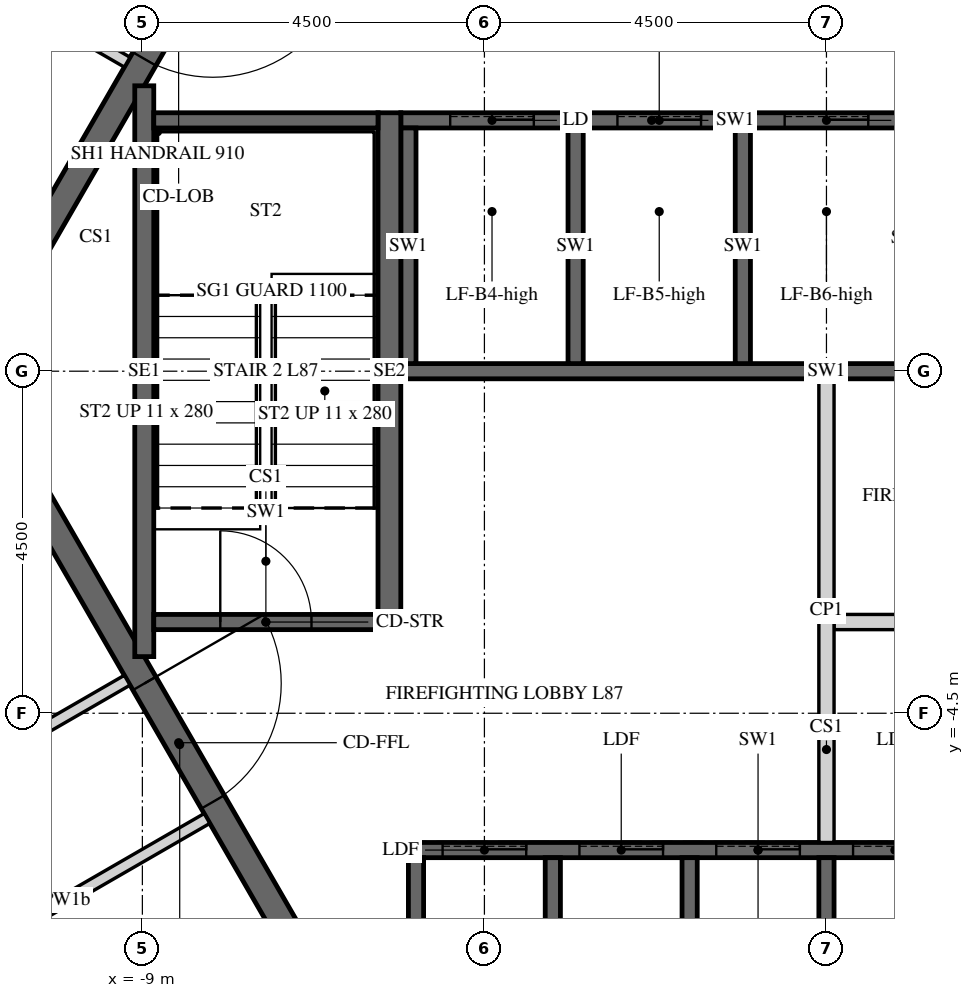
"""IFC4 building model, lengths in metres.
Left out: names, types, materials, properties, quantities, classifications, styles, units other than length and angle.
Written with IfcOpenShell. Run it as: python <this file> out.ifc"""

import sys

from ifc_helpers import new_model, si_unit, direction, frame, frame_2d, origin, place, context, subcontext, project, spatial, polyline, rectangle, outline, extrude, element, fill, save


model = new_model("IFC4")
c1 = context("Model", 3, precision=1e-05, world=origin(), true_north=direction((0.0, 1.0)))
c2 = subcontext(c1, "Body", "Model", "MODEL_VIEW")
j1 = project(units=[si_unit("LENGTHUNIT", "METRE"), si_unit("PLANEANGLEUNIT", "RADIAN")], contexts=[c1])
p1 = place(None, origin())
s1 = spatial("IfcSite", under=j1, at=p1, CompositionType="ELEMENT")
p2 = place(p1, origin())
s2 = spatial("IfcBuilding", under=s1, at=p2, CompositionType="ELEMENT")
p3 = place(p2, frame((0.0, 0.0, 361.2)))
s3 = spatial("IfcBuildingStorey", under=s2, at=p3, CompositionType="ELEMENT", Elevation=361.2)
p4 = place(p3, frame((-5.673, 9.825, -0.15), z_axis=(0.0, 0.0, 1.0), x_axis=(-0.499995046907, -0.866028263435, 0.0)))
e1 = element("IfcWall", 1, at=p4, inside=s3, PredefinedType="SHEAR", context=c2, shape_type="SweptSolid", body=[
    extrude(outline(polyline([(-0.101, -0.175), (11.446, -0.175), (11.244, 0.175), (0.101, 0.175), (-0.101, -0.175)])), origin(), (0.0, 0.0, 1.0), 3.9),
])
p5 = place(p4, frame((4.801, 0.0, 0.15)))
e2 = element("IfcOpeningElement", 2, at=p5, cuts=e1, PredefinedType="OPENING", context=c2, shape_type="SweptSolid", body=[
    extrude(rectangle(XDim=1.8, YDim=2.4, at=frame_2d((0.9, 1.2))), frame((0.0, 0.185, 0.0), z_axis=(0.0, -1.0, 0.0), x_axis=(1.0, 0.0, 0.0)), (0.0, 0.0, 1.0), 0.37),
])
p6 = place(p3, frame((-11.345, 0.0, -0.15), z_axis=(0.0, 0.0, 1.0), x_axis=(0.499995046907, -0.866028263435, 0.0)))
e3 = element("IfcWall", 3, at=p6, inside=s3, PredefinedType="SHEAR", context=c2, shape_type="SweptSolid", body=[
    extrude(outline(polyline([(-0.101, -0.175), (11.446, -0.175), (11.244, 0.175), (0.101, 0.175), (-0.101, -0.175)])), origin(), (0.0, 0.0, 1.0), 3.9),
])
p7 = place(p6, frame((4.744, 0.0, 0.15)))
e4 = element("IfcOpeningElement", 4, at=p7, cuts=e3, PredefinedType="OPENING", context=c2, shape_type="SweptSolid", body=[
    extrude(rectangle(XDim=1.8, YDim=2.4, at=frame_2d((0.9, 1.2))), frame((0.0, 0.185, 0.0), z_axis=(0.0, -1.0, 0.0), x_axis=(1.0, 0.0, 0.0)), (0.0, 0.0, 1.0), 0.37),
])
p8 = place(p3, frame((-5.6, 3.3, -0.25), z_axis=(0.0, 0.0, 1.0), x_axis=(1.0, 0.0, 0.0)))
e5 = element("IfcWall", 5, at=p8, inside=s3, PredefinedType="SHEAR", context=c2, shape_type="SweptSolid", body=[
    extrude(rectangle(XDim=6.6, YDim=0.2, at=frame_2d((3.3, 0.0))), origin(), (0.0, 0.0, 1.0), 3.9),
])
p9 = place(p8, frame((0.65, 0.0, 0.25)))
e6 = element("IfcOpeningElement", 6, at=p9, cuts=e5, PredefinedType="OPENING", context=c2, shape_type="SweptSolid", body=[
    extrude(rectangle(XDim=1.1, YDim=2.1, at=frame_2d((0.55, 1.05))), frame((0.0, 0.11, 0.0), z_axis=(0.0, -1.0, 0.0), x_axis=(1.0, 0.0, 0.0)), (0.0, 0.0, 1.0), 0.22),
])
p10 = place(p8, frame((2.85, 0.0, 0.25)))
e7 = element("IfcOpeningElement", 7, at=p10, cuts=e5, PredefinedType="OPENING", context=c2, shape_type="SweptSolid", body=[
    extrude(rectangle(XDim=1.1, YDim=2.1, at=frame_2d((0.55, 1.05))), frame((0.0, 0.11, 0.0), z_axis=(0.0, -1.0, 0.0), x_axis=(1.0, 0.0, 0.0)), (0.0, 0.0, 1.0), 0.22),
])
p11 = place(p8, frame((5.05, 0.0, 0.25)))
e8 = element("IfcOpeningElement", 8, at=p11, cuts=e5, PredefinedType="OPENING", context=c2, shape_type="SweptSolid", body=[
    extrude(rectangle(XDim=1.1, YDim=2.1, at=frame_2d((0.55, 1.05))), frame((0.0, 0.11, 0.0), z_axis=(0.0, -1.0, 0.0), x_axis=(1.0, 0.0, 0.0)), (0.0, 0.0, 1.0), 0.22),
])
p12 = place(p3, frame((-5.6, 0.0, -0.25), z_axis=(0.0, 0.0, 1.0), x_axis=(1.0, 0.0, 0.0)))
e9 = element("IfcWall", 9, at=p12, inside=s3, PredefinedType="SHEAR", context=c2, shape_type="SweptSolid", body=[
    extrude(rectangle(XDim=11.2, YDim=0.2, at=frame_2d((5.6, 0.0))), origin(), (0.0, 0.0, 1.0), 3.9),
])
for number, where, z_axis, x_axis in (
    (10, (-5.5, 0.1, -0.25), (0.0, 0.0, 1.0), (0.0, 1.0, 0.0)),
    (11, (-3.3, 0.1, -0.25), (0.0, 0.0, 1.0), (0.0, 1.0, 0.0)),
    (12, (-1.1, 0.1, -0.25), (0.0, 0.0, 1.0), (0.0, 1.0, 0.0)),
):
    element("IfcWall", number, at=place(p3, frame(where, z_axis=z_axis, x_axis=x_axis)), inside=s3, PredefinedType="SHEAR", context=c2, shape_type="SweptSolid", body=[
        extrude(rectangle(XDim=3.1, YDim=0.2, at=frame_2d((1.55, 0.0))), origin(), (0.0, 0.0, 1.0), 3.9),
    ])
p13 = place(p3, frame((-5.5, -6.3, -0.25), z_axis=(0.0, 0.0, 1.0), x_axis=(1.0, 0.0, 0.0)))
e13 = element("IfcWall", 13, at=p13, inside=s3, PredefinedType="SHEAR", context=c2, shape_type="SweptSolid", body=[
    extrude(rectangle(XDim=9.2, YDim=0.2, at=frame_2d((4.6, 0.0))), origin(), (0.0, 0.0, 1.0), 3.9),
])
p14 = place(p13, frame((0.45, 0.0, 0.25)))
e14 = element("IfcOpeningElement", 14, at=p14, cuts=e13, PredefinedType="OPENING", context=c2, shape_type="SweptSolid", body=[
    extrude(rectangle(XDim=1.1, YDim=2.1, at=frame_2d((0.55, 1.05))), frame((0.0, 0.11, 0.0), z_axis=(0.0, -1.0, 0.0), x_axis=(1.0, 0.0, 0.0)), (0.0, 0.0, 1.0), 0.22),
])
p15 = place(p13, frame((2.25, 0.0, 0.25)))
e15 = element("IfcOpeningElement", 15, at=p15, cuts=e13, PredefinedType="OPENING", context=c2, shape_type="SweptSolid", body=[
    extrude(rectangle(XDim=1.1, YDim=2.1, at=frame_2d((0.55, 1.05))), frame((0.0, 0.11, 0.0), z_axis=(0.0, -1.0, 0.0), x_axis=(1.0, 0.0, 0.0)), (0.0, 0.0, 1.0), 0.22),
])
p16 = place(p13, frame((4.05, 0.0, 0.25)))
e16 = element("IfcOpeningElement", 16, at=p16, cuts=e13, PredefinedType="OPENING", context=c2, shape_type="SweptSolid", body=[
    extrude(rectangle(XDim=1.1, YDim=2.1, at=frame_2d((0.55, 1.05))), frame((0.0, 0.11, 0.0), z_axis=(0.0, -1.0, 0.0), x_axis=(1.0, 0.0, 0.0)), (0.0, 0.0, 1.0), 0.22),
])
p17 = place(p13, frame((5.85, 0.0, 0.25)))
e17 = element("IfcOpeningElement", 17, at=p17, cuts=e13, PredefinedType="OPENING", context=c2, shape_type="SweptSolid", body=[
    extrude(rectangle(XDim=1.1, YDim=2.1, at=frame_2d((0.55, 1.05))), frame((0.0, 0.11, 0.0), z_axis=(0.0, -1.0, 0.0), x_axis=(1.0, 0.0, 0.0)), (0.0, 0.0, 1.0), 0.22),
])
p18 = place(p13, frame((7.65, 0.0, 0.25)))
e18 = element("IfcOpeningElement", 18, at=p18, cuts=e13, PredefinedType="OPENING", context=c2, shape_type="SweptSolid", body=[
    extrude(rectangle(XDim=1.1, YDim=2.1, at=frame_2d((0.55, 1.05))), frame((0.0, 0.11, 0.0), z_axis=(0.0, -1.0, 0.0), x_axis=(1.0, 0.0, 0.0)), (0.0, 0.0, 1.0), 0.22),
])
for number, where, z_axis, x_axis in (
    (19, (-5.4, -9.3, -0.25), (0.0, 0.0, 1.0), (0.0, 1.0, 0.0)),
    (20, (-3.6, -9.3, -0.25), (0.0, 0.0, 1.0), (0.0, 1.0, 0.0)),
    (21, (-1.8, -9.3, -0.25), (0.0, 0.0, 1.0), (0.0, 1.0, 0.0)),
    (22, (0.0, -9.3, -0.25), (0.0, 0.0, 1.0), (0.0, 1.0, 0.0)),
):
    element("IfcWall", number, at=place(p3, frame(where, z_axis=z_axis, x_axis=x_axis)), inside=s3, PredefinedType="SHEAR", context=c2, shape_type="SweptSolid", body=[
        extrude(rectangle(XDim=2.9, YDim=0.2, at=frame_2d((1.45, 0.0))), origin(), (0.0, 0.0, 1.0), 3.9),
    ])
p19 = place(p3, frame((0.1, -3.3, 0.0), z_axis=(0.0, 0.0, 1.0), x_axis=(1.0, 0.0, 0.0)))
e23 = element("IfcWall", 23, at=p19, inside=s3, PredefinedType="PARTITIONING", context=c2, shape_type="SweptSolid", body=[
    extrude(rectangle(XDim=5.5, YDim=0.2, at=frame_2d((2.75, 0.0))), origin(), (0.0, 0.0, 1.0), 3.65),
])
p20 = place(p19, frame((2.3, 0.0, 0.0)))
e24 = element("IfcOpeningElement", 24, at=p20, cuts=e23, PredefinedType="OPENING", context=c2, shape_type="SweptSolid", body=[
    extrude(rectangle(XDim=0.9, YDim=2.1, at=frame_2d((0.45, 1.05))), frame((0.0, 0.11, 0.0), z_axis=(0.0, -1.0, 0.0), x_axis=(1.0, 0.0, 0.0)), (0.0, 0.0, 1.0), 0.22),
])
p21 = place(p3, frame((0.0, -6.2, 0.0), z_axis=(0.0, 0.0, 1.0), x_axis=(0.0, 1.0, 0.0)))
e25 = element("IfcWall", 25, at=p21, inside=s3, PredefinedType="PARTITIONING", context=c2, shape_type="SweptSolid", body=[
    extrude(rectangle(XDim=6.1, YDim=0.2, at=frame_2d((3.05, 0.0))), origin(), (0.0, 0.0, 1.0), 3.65),
])
p22 = place(p3, frame((-5.75, -3.4, -0.25), z_axis=(0.0, 0.0, 1.0), x_axis=(0.0, 1.0, 0.0)))
e26 = element("IfcWall", 26, at=p22, inside=s3, PredefinedType="SHEAR", context=c2, shape_type="SweptSolid", body=[
    extrude(rectangle(XDim=6.8, YDim=0.3, at=frame_2d((3.4, 0.0))), origin(), (0.0, 0.0, 1.0), 3.9),
])
p23 = place(p3, frame((-8.975, -3.755, -0.25), z_axis=(0.0, 0.0, 1.0), x_axis=(0.0, 1.0, 0.0)))
e27 = element("IfcWall", 27, at=p23, inside=s3, PredefinedType="SHEAR", context=c2, shape_type="SweptSolid", body=[
    extrude(rectangle(XDim=7.51, YDim=0.25, at=frame_2d((3.755, 0.0))), origin(), (0.0, 0.0, 1.0), 3.9),
])
p24 = place(p3, frame((-8.85, 3.3, -0.25), z_axis=(0.0, 0.0, 1.0), x_axis=(1.0, 0.0, 0.0)))
e28 = element("IfcWall", 28, at=p24, inside=s3, PredefinedType="SHEAR", context=c2, shape_type="SweptSolid", body=[
    extrude(rectangle(XDim=2.95, YDim=0.2, at=frame_2d((1.475, 0.0))), origin(), (0.0, 0.0, 1.0), 3.9),
])
p25 = place(p3, frame((-8.85, -3.3, -0.25), z_axis=(0.0, 0.0, 1.0), x_axis=(1.0, 0.0, 0.0)))
e29 = element("IfcWall", 29, at=p25, inside=s3, PredefinedType="SHEAR", context=c2, shape_type="SweptSolid", body=[
    extrude(rectangle(XDim=2.95, YDim=0.2, at=frame_2d((1.475, 0.0))), origin(), (0.0, 0.0, 1.0), 3.9),
])
p26 = place(p25, frame((0.875, 0.0, 0.25)))
e30 = element("IfcOpeningElement", 30, at=p26, cuts=e29, PredefinedType="OPENING", context=c2, shape_type="SweptSolid", body=[
    extrude(rectangle(XDim=1.2, YDim=2.4, at=frame_2d((0.6, 1.2))), frame((0.0, 0.11, 0.0), z_axis=(0.0, -1.0, 0.0), x_axis=(1.0, 0.0, 0.0)), (0.0, 0.0, 1.0), 0.22),
])
p27 = place(p3, frame((-7.903, 16.075, 0.0), z_axis=(0.0, 0.0, 1.0), x_axis=(-0.438364761272, -0.898797160696, 0.0)))
e31 = element("IfcWall", 31, at=p27, inside=s3, PredefinedType="PARTITIONING", context=c2, shape_type="SweptSolid", body=[
    extrude(rectangle(XDim=15.688, YDim=0.15, at=frame_2d((7.844, 0.0))), origin(), (0.0, 0.0, 1.0), 2.82),
])
p28 = place(p27, frame((5.042, 0.0, 0.0)))
e32 = element("IfcOpeningElement", 32, at=p28, cuts=e31, PredefinedType="OPENING", context=c2, shape_type="SweptSolid", body=[
    extrude(rectangle(XDim=1.0, YDim=2.1, at=frame_2d((0.5, 1.05))), frame((0.0, 0.085, 0.0), z_axis=(0.0, -1.0, 0.0), x_axis=(1.0, 0.0, 0.0)), (0.0, 0.0, 1.0), 0.17),
])
p29 = place(p3, frame((-11.131, 5.18, 0.0), z_axis=(0.0, 0.0, 1.0), x_axis=(0.866037886895, -0.499978377995, 0.0)))
e33 = element("IfcWall", 33, at=p29, inside=s3, PredefinedType="PARTITIONING", context=c2, shape_type="SweptSolid", body=[
    extrude(rectangle(XDim=2.229, YDim=0.15, at=frame_2d((1.115, 0.0))), origin(), (0.0, 0.0, 1.0), 2.82),
])
p30 = place(p3, frame((-17.036, -2.792, 0.0), z_axis=(0.0, 0.0, 1.0), x_axis=(0.500006428338, -0.86602169235, 0.0)))
e34 = element("IfcWall", 34, at=p30, inside=s3, PredefinedType="PARTITIONING", context=c2, shape_type="SweptSolid", body=[
    extrude(rectangle(XDim=13.966, YDim=0.15, at=frame_2d((6.983, 0.0))), origin(), (0.0, 0.0, 1.0), 2.82),
])
p31 = place(p30, frame((3.325, 0.0, 0.0)))
e35 = element("IfcOpeningElement", 35, at=p31, cuts=e34, PredefinedType="OPENING", context=c2, shape_type="SweptSolid", body=[
    extrude(rectangle(XDim=1.0, YDim=2.1, at=frame_2d((0.5, 1.05))), frame((0.0, 0.085, 0.0), z_axis=(0.0, -1.0, 0.0), x_axis=(1.0, 0.0, 0.0)), (0.0, 0.0, 1.0), 0.17),
])
p32 = place(p3, frame((-9.2, -4.066, 0.0), z_axis=(0.0, 0.0, 1.0), x_axis=(-0.866013608182, -0.500020430026, 0.0)))
e36 = element("IfcWall", 36, at=p32, inside=s3, PredefinedType="PARTITIONING", context=c2, shape_type="SweptSolid", body=[
    extrude(rectangle(XDim=4.35, YDim=0.15, at=frame_2d((2.175, 0.0))), origin(), (0.0, 0.0, 1.0), 2.82),
])
p33 = place(p32, frame((1.725, 0.0, 0.0)))
e37 = element("IfcOpeningElement", 37, at=p33, cuts=e36, PredefinedType="OPENING", context=c2, shape_type="SweptSolid", body=[
    extrude(rectangle(XDim=0.9, YDim=2.1, at=frame_2d((0.45, 1.05))), frame((0.0, 0.085, 0.0), z_axis=(0.0, -1.0, 0.0), x_axis=(1.0, 0.0, 0.0)), (0.0, 0.0, 1.0), 0.17),
])
p34 = place(p3, frame((-11.852, -8.022, 0.0), z_axis=(0.0, 0.0, 1.0), x_axis=(0.866038183914, 0.499977863513, 0.0)))
e38 = element("IfcWall", 38, at=p34, inside=s3, PredefinedType="PARTITIONING", context=c2, shape_type="SweptSolid", body=[
    extrude(rectangle(XDim=4.275, YDim=0.15, at=frame_2d((2.138, 0.0))), origin(), (0.0, 0.0, 1.0), 2.82),
])
p35 = place(p5, origin())
e39 = element("IfcDoor", 39, at=p35, inside=s3, OperationType="DOUBLE_DOOR_SINGLE_SWING", PredefinedType="DOOR", context=c2, shape_type="SweptSolid", body=[
    extrude(rectangle(XDim=1.8, YDim=2.4, at=frame_2d((0.9, 1.2))), frame((0.0, 0.025, 0.0), z_axis=(0.0, -1.0, 0.0), x_axis=(1.0, 0.0, 0.0)), (0.0, 0.0, 1.0), 0.05),
])
fill(e2, e39)
p36 = place(p7, origin())
e40 = element("IfcDoor", 40, at=p36, inside=s3, OperationType="DOUBLE_DOOR_SINGLE_SWING", PredefinedType="DOOR", context=c2, shape_type="SweptSolid", body=[
    extrude(rectangle(XDim=1.8, YDim=2.4, at=frame_2d((0.9, 1.2))), frame((0.0, 0.025, 0.0), z_axis=(0.0, -1.0, 0.0), x_axis=(1.0, 0.0, 0.0)), (0.0, 0.0, 1.0), 0.05),
])
fill(e4, e40)
p37 = place(p26, origin())
e41 = element("IfcDoor", 41, at=p37, inside=s3, OperationType="SINGLE_SWING_LEFT", PredefinedType="DOOR", context=c2, shape_type="SweptSolid", body=[
    extrude(rectangle(XDim=1.2, YDim=2.4, at=frame_2d((0.6, 1.2))), frame((0.0, 0.025, 0.0), z_axis=(0.0, -1.0, 0.0), x_axis=(1.0, 0.0, 0.0)), (0.0, 0.0, 1.0), 0.05),
])
fill(e30, e41)
p38 = place(p9, origin())
e42 = element("IfcDoor", 42, at=p38, inside=s3, OperationType="SLIDING_TO_LEFT", PredefinedType="DOOR", context=c2, shape_type="SweptSolid", body=[
    extrude(rectangle(XDim=1.1, YDim=2.1, at=frame_2d((0.55, 1.05))), frame((0.0, 0.025, 0.0), z_axis=(0.0, -1.0, 0.0), x_axis=(1.0, 0.0, 0.0)), (0.0, 0.0, 1.0), 0.05),
])
fill(e6, e42)
p39 = place(p10, origin())
e43 = element("IfcDoor", 43, at=p39, inside=s3, OperationType="SLIDING_TO_LEFT", PredefinedType="DOOR", context=c2, shape_type="SweptSolid", body=[
    extrude(rectangle(XDim=1.1, YDim=2.1, at=frame_2d((0.55, 1.05))), frame((0.0, 0.025, 0.0), z_axis=(0.0, -1.0, 0.0), x_axis=(1.0, 0.0, 0.0)), (0.0, 0.0, 1.0), 0.05),
])
fill(e7, e43)
p40 = place(p11, origin())
e44 = element("IfcDoor", 44, at=p40, inside=s3, OperationType="SLIDING_TO_LEFT", PredefinedType="DOOR", context=c2, shape_type="SweptSolid", body=[
    extrude(rectangle(XDim=1.1, YDim=2.1, at=frame_2d((0.55, 1.05))), frame((0.0, 0.025, 0.0), z_axis=(0.0, -1.0, 0.0), x_axis=(1.0, 0.0, 0.0)), (0.0, 0.0, 1.0), 0.05),
])
fill(e8, e44)
p41 = place(p14, origin())
e45 = element("IfcDoor", 45, at=p41, inside=s3, OperationType="SLIDING_TO_LEFT", PredefinedType="DOOR", context=c2, shape_type="SweptSolid", body=[
    extrude(rectangle(XDim=1.1, YDim=2.1, at=frame_2d((0.55, 1.05))), frame((0.0, 0.025, 0.0), z_axis=(0.0, -1.0, 0.0), x_axis=(1.0, 0.0, 0.0)), (0.0, 0.0, 1.0), 0.05),
])
fill(e14, e45)
p42 = place(p15, origin())
e46 = element("IfcDoor", 46, at=p42, inside=s3, OperationType="SLIDING_TO_LEFT", PredefinedType="DOOR", context=c2, shape_type="SweptSolid", body=[
    extrude(rectangle(XDim=1.1, YDim=2.1, at=frame_2d((0.55, 1.05))), frame((0.0, 0.025, 0.0), z_axis=(0.0, -1.0, 0.0), x_axis=(1.0, 0.0, 0.0)), (0.0, 0.0, 1.0), 0.05),
])
fill(e15, e46)
p43 = place(p16, origin())
e47 = element("IfcDoor", 47, at=p43, inside=s3, OperationType="SLIDING_TO_LEFT", PredefinedType="DOOR", context=c2, shape_type="SweptSolid", body=[
    extrude(rectangle(XDim=1.1, YDim=2.1, at=frame_2d((0.55, 1.05))), frame((0.0, 0.025, 0.0), z_axis=(0.0, -1.0, 0.0), x_axis=(1.0, 0.0, 0.0)), (0.0, 0.0, 1.0), 0.05),
])
fill(e16, e47)
p44 = place(p17, origin())
e48 = element("IfcDoor", 48, at=p44, inside=s3, OperationType="SLIDING_TO_LEFT", PredefinedType="DOOR", context=c2, shape_type="SweptSolid", body=[
    extrude(rectangle(XDim=1.1, YDim=2.1, at=frame_2d((0.55, 1.05))), frame((0.0, 0.025, 0.0), z_axis=(0.0, -1.0, 0.0), x_axis=(1.0, 0.0, 0.0)), (0.0, 0.0, 1.0), 0.05),
])
fill(e17, e48)
save(model, sys.argv[1])
